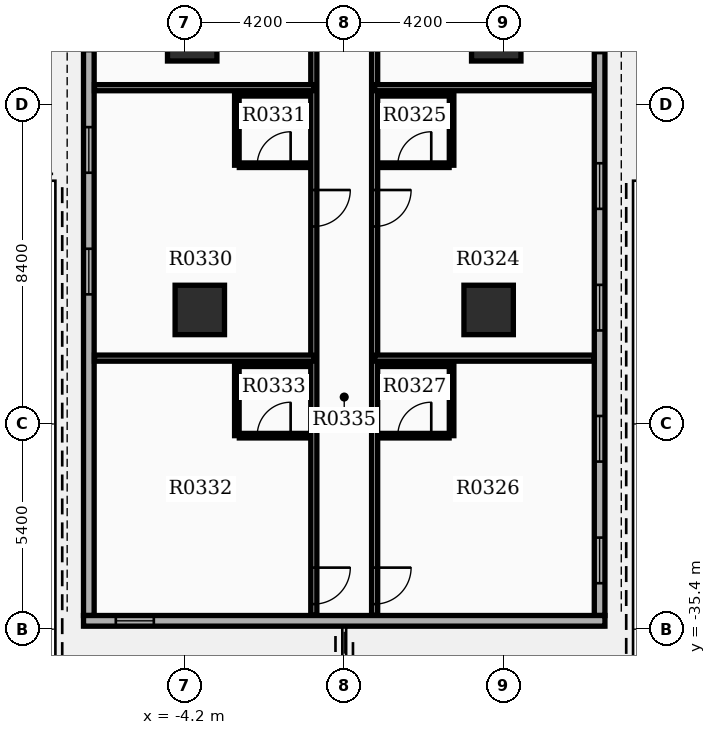
"""IFC4 building model, lengths in metres.
Left out: names, types, materials, properties, quantities, classifications, styles, units other than length and angle.
Written with IfcOpenShell. Run it as: python <this file> out.ifc"""

import sys

from ifc_helpers import new_model, si_unit, direction, frame, frame_2d, origin, origin_2d, place, context, subcontext, project, spatial, rectangle, extrude, element, fill, save


model = new_model("IFC4")
c1 = context("Model", 3, precision=1e-05, world=origin(), true_north=direction((0.0, 1.0)))
c2 = subcontext(c1, "Body", "Model", "MODEL_VIEW")
j1 = project(units=[si_unit("LENGTHUNIT", "METRE"), si_unit("PLANEANGLEUNIT", "RADIAN")], contexts=[c1])
p1 = place(None, origin())
s1 = spatial("IfcSite", under=j1, at=p1, CompositionType="ELEMENT")
p2 = place(p1, origin())
s2 = spatial("IfcBuilding", under=s1, at=p2, CompositionType="ELEMENT")
p3 = place(p2, frame((0.0, 0.0, 23.7)))
s3 = spatial("IfcBuildingStorey", under=s2, at=p3, CompositionType="ELEMENT", Elevation=23.7)
for number, where, z_axis, x_axis in (
    (1, (-4.0, -19.8, 0.0), (0.0, 0.0, 1.0), (1.0, 0.0, 0.0)),
    (2, (4.0, -19.8, 0.0), (0.0, 0.0, 1.0), (1.0, 0.0, 0.0)),
    (3, (-3.8, -27.0, 0.0), (0.0, 0.0, 1.0), (1.0, 0.0, 0.0)),
    (4, (3.8, -27.0, 0.0), (0.0, 0.0, 1.0), (1.0, 0.0, 0.0)),
):
    element("IfcColumn", number, at=place(p3, frame(where, z_axis=z_axis, x_axis=x_axis)), inside=s3, PredefinedType="COLUMN", context=c2, shape_type="SweptSolid", body=[
        extrude(rectangle(XDim=1.3, YDim=1.3, at=origin_2d()), origin(), (0.0, 0.0, 1.0), 3.9),
    ])
p4 = place(p3, frame((-6.72, -14.94, 0.0), z_axis=(0.0, 0.0, 1.0), x_axis=(0.0, -1.0, 0.0)))
e5 = element("IfcWall", 5, at=p4, inside=s3, PredefinedType="STANDARD", context=c2, shape_type="SweptSolid", body=[
    extrude(rectangle(XDim=20.1, YDim=0.28, at=frame_2d((10.05, 0.0))), origin(), (0.0, 0.0, 1.0), 2.91),
])
p5 = place(p4, frame((0.85, 0.0, 0.8)))
e6 = element("IfcOpeningElement", 6, at=p5, cuts=e5, PredefinedType="OPENING", context=c2, shape_type="SweptSolid", body=[
    extrude(rectangle(XDim=1.2, YDim=1.6, at=frame_2d((0.6, 0.8))), frame((0.0, 0.15, 0.0), z_axis=(0.0, -1.0, 0.0), x_axis=(1.0, 0.0, 0.0)), (0.0, 0.0, 1.0), 0.3),
])
p6 = place(p4, frame((4.05, 0.0, 0.8)))
e7 = element("IfcOpeningElement", 7, at=p6, cuts=e5, PredefinedType="OPENING", context=c2, shape_type="SweptSolid", body=[
    extrude(rectangle(XDim=1.2, YDim=1.6, at=frame_2d((0.6, 0.8))), frame((0.0, 0.15, 0.0), z_axis=(0.0, -1.0, 0.0), x_axis=(1.0, 0.0, 0.0)), (0.0, 0.0, 1.0), 0.3),
])
p7 = place(p4, frame((7.25, 0.0, 0.8)))
e8 = element("IfcOpeningElement", 8, at=p7, cuts=e5, PredefinedType="OPENING", context=c2, shape_type="SweptSolid", body=[
    extrude(rectangle(XDim=1.2, YDim=1.6, at=frame_2d((0.6, 0.8))), frame((0.0, 0.15, 0.0), z_axis=(0.0, -1.0, 0.0), x_axis=(1.0, 0.0, 0.0)), (0.0, 0.0, 1.0), 0.3),
])
p8 = place(p4, frame((10.45, 0.0, 0.8)))
e9 = element("IfcOpeningElement", 9, at=p8, cuts=e5, PredefinedType="OPENING", context=c2, shape_type="SweptSolid", body=[
    extrude(rectangle(XDim=1.2, YDim=1.6, at=frame_2d((0.6, 0.8))), frame((0.0, 0.15, 0.0), z_axis=(0.0, -1.0, 0.0), x_axis=(1.0, 0.0, 0.0)), (0.0, 0.0, 1.0), 0.3),
])
p9 = place(p3, frame((6.72, -35.04, 0.0), z_axis=(0.0, 0.0, 1.0), x_axis=(0.0, 1.0, 0.0)))
e10 = element("IfcWall", 10, at=p9, inside=s3, PredefinedType="STANDARD", context=c2, shape_type="SweptSolid", body=[
    extrude(rectangle(XDim=20.1, YDim=0.28, at=frame_2d((10.05, 0.0))), origin(), (0.0, 0.0, 1.0), 2.91),
])
p10 = place(p9, frame((0.85, 0.0, 0.8)))
e11 = element("IfcOpeningElement", 11, at=p10, cuts=e10, PredefinedType="OPENING", context=c2, shape_type="SweptSolid", body=[
    extrude(rectangle(XDim=1.2, YDim=1.6, at=frame_2d((0.6, 0.8))), frame((0.0, 0.15, 0.0), z_axis=(0.0, -1.0, 0.0), x_axis=(1.0, 0.0, 0.0)), (0.0, 0.0, 1.0), 0.3),
])
p11 = place(p9, frame((4.05, 0.0, 0.8)))
e12 = element("IfcOpeningElement", 12, at=p11, cuts=e10, PredefinedType="OPENING", context=c2, shape_type="SweptSolid", body=[
    extrude(rectangle(XDim=1.2, YDim=1.6, at=frame_2d((0.6, 0.8))), frame((0.0, 0.15, 0.0), z_axis=(0.0, -1.0, 0.0), x_axis=(1.0, 0.0, 0.0)), (0.0, 0.0, 1.0), 0.3),
])
p12 = place(p9, frame((7.5, 0.0, 0.8)))
e13 = element("IfcOpeningElement", 13, at=p12, cuts=e10, PredefinedType="OPENING", context=c2, shape_type="SweptSolid", body=[
    extrude(rectangle(XDim=1.2, YDim=1.6, at=frame_2d((0.6, 0.8))), frame((0.0, 0.15, 0.0), z_axis=(0.0, -1.0, 0.0), x_axis=(1.0, 0.0, 0.0)), (0.0, 0.0, 1.0), 0.3),
])
p13 = place(p9, frame((10.7, 0.0, 0.8)))
e14 = element("IfcOpeningElement", 14, at=p13, cuts=e10, PredefinedType="OPENING", context=c2, shape_type="SweptSolid", body=[
    extrude(rectangle(XDim=1.2, YDim=1.6, at=frame_2d((0.6, 0.8))), frame((0.0, 0.15, 0.0), z_axis=(0.0, -1.0, 0.0), x_axis=(1.0, 0.0, 0.0)), (0.0, 0.0, 1.0), 0.3),
])
p14 = place(p9, frame((14.799, 0.0, 0.85)))
e15 = element("IfcOpeningElement", 15, at=p14, cuts=e10, PredefinedType="OPENING", context=c2, shape_type="SweptSolid", body=[
    extrude(rectangle(XDim=1.2, YDim=1.6, at=frame_2d((0.6, 0.8))), frame((0.0, 0.15, 0.0), z_axis=(0.0, -1.0, 0.0), x_axis=(1.0, 0.0, 0.0)), (0.0, 0.0, 1.0), 0.3),
])
p15 = place(p3, frame((-6.86, -35.18, 0.0), z_axis=(0.0, 0.0, 1.0), x_axis=(1.0, 0.0, 0.0)))
e16 = element("IfcWall", 16, at=p15, inside=s3, PredefinedType="STANDARD", context=c2, shape_type="SweptSolid", body=[
    extrude(rectangle(XDim=13.72, YDim=0.28, at=frame_2d((6.86, 0.0))), origin(), (0.0, 0.0, 1.0), 2.91),
])
p16 = place(p15, frame((0.85, 0.0, 0.85)))
e17 = element("IfcOpeningElement", 17, at=p16, cuts=e16, PredefinedType="OPENING", context=c2, shape_type="SweptSolid", body=[
    extrude(rectangle(XDim=1.0, YDim=1.5, at=frame_2d((0.5, 0.75))), frame((0.0, 0.15, 0.0), z_axis=(0.0, -1.0, 0.0), x_axis=(1.0, 0.0, 0.0)), (0.0, 0.0, 1.0), 0.3),
])
p17 = place(p3, frame((0.8, -14.85, 0.0), z_axis=(0.0, 0.0, 1.0), x_axis=(0.0, -1.0, 0.0)))
e18 = element("IfcWall", 18, at=p17, inside=s3, PredefinedType="PARTITIONING", context=c2, shape_type="SweptSolid", body=[
    extrude(rectangle(XDim=20.182, YDim=0.16, at=frame_2d((10.091, 0.0))), origin(), (0.0, 0.0, 1.0), 2.9),
])
p18 = place(p17, frame((2.61, 0.0, 0.0)))
e19 = element("IfcOpeningElement", 19, at=p18, cuts=e18, PredefinedType="OPENING", context=c2, shape_type="SweptSolid", body=[
    extrude(rectangle(XDim=0.96, YDim=2.15, at=frame_2d((0.48, 1.075))), frame((0.0, 0.09, 0.0), z_axis=(0.0, -1.0, 0.0), x_axis=(1.0, 0.0, 0.0)), (0.0, 0.0, 1.0), 0.18),
])
p19 = place(p17, frame((8.994, 0.0, 0.0)))
e20 = element("IfcOpeningElement", 20, at=p19, cuts=e18, PredefinedType="OPENING", context=c2, shape_type="SweptSolid", body=[
    extrude(rectangle(XDim=0.96, YDim=2.15, at=frame_2d((0.48, 1.075))), frame((0.0, 0.09, 0.0), z_axis=(0.0, -1.0, 0.0), x_axis=(1.0, 0.0, 0.0)), (0.0, 0.0, 1.0), 0.18),
])
p20 = place(p17, frame((18.93, 0.0, 0.0)))
e21 = element("IfcOpeningElement", 21, at=p20, cuts=e18, PredefinedType="OPENING", context=c2, shape_type="SweptSolid", body=[
    extrude(rectangle(XDim=0.96, YDim=2.15, at=frame_2d((0.48, 1.075))), frame((0.0, 0.09, 0.0), z_axis=(0.0, -1.0, 0.0), x_axis=(1.0, 0.0, 0.0)), (0.0, 0.0, 1.0), 0.18),
])
for number, where, z_axis, x_axis in (
    (22, (0.8, -21.152, 0.0), (0.0, 0.0, 1.0), (1.0, 0.0, 0.0)),
    (23, (0.8, -28.268, 0.0), (0.0, 0.0, 1.0), (1.0, 0.0, 0.0)),
):
    element("IfcWall", number, at=place(p3, frame(where, z_axis=z_axis, x_axis=x_axis)), inside=s3, PredefinedType="PARTITIONING", context=c2, shape_type="SweptSolid", body=[
        extrude(rectangle(XDim=5.772, YDim=0.16, at=frame_2d((2.886, 0.0))), origin(), (0.0, 0.0, 1.0), 2.9),
    ])
p21 = place(p3, frame((0.94, -23.192, 0.0), z_axis=(0.0, 0.0, 1.0), x_axis=(1.0, 0.0, 0.0)))
e24 = element("IfcWall", 24, at=p21, inside=s3, PredefinedType="PARTITIONING", context=c2, shape_type="SweptSolid", body=[
    extrude(rectangle(XDim=1.82, YDim=0.12, at=frame_2d((0.91, 0.0))), origin(), (0.0, 0.0, 1.0), 2.9),
])
p22 = place(p21, frame((0.47, 0.0, 0.0)))
e25 = element("IfcOpeningElement", 25, at=p22, cuts=e24, PredefinedType="OPENING", context=c2, shape_type="SweptSolid", body=[
    extrude(rectangle(XDim=0.88, YDim=2.1, at=frame_2d((0.44, 1.05))), frame((0.0, 0.07, 0.0), z_axis=(0.0, -1.0, 0.0), x_axis=(1.0, 0.0, 0.0)), (0.0, 0.0, 1.0), 0.14),
])
p23 = place(p3, frame((0.94, -21.312, 0.0), z_axis=(0.0, 0.0, 1.0), x_axis=(1.0, 0.0, 0.0)))
e26 = element("IfcWall", 26, at=p23, inside=s3, PredefinedType="PARTITIONING", context=c2, shape_type="SweptSolid", body=[
    extrude(rectangle(XDim=1.82, YDim=0.12, at=frame_2d((0.91, 0.0))), origin(), (0.0, 0.0, 1.0), 2.9),
])
p24 = place(p3, frame((2.825, -21.312, 0.0), z_axis=(0.0, 0.0, 1.0), x_axis=(0.0, -1.0, 0.0)))
e27 = element("IfcWall", 27, at=p24, inside=s3, PredefinedType="PARTITIONING", context=c2, shape_type="SweptSolid", body=[
    extrude(rectangle(XDim=1.88, YDim=0.12, at=frame_2d((0.94, 0.0))), origin(), (0.0, 0.0, 1.0), 2.9),
])
p25 = place(p3, frame((0.94, -30.308, 0.0), z_axis=(0.0, 0.0, 1.0), x_axis=(1.0, 0.0, 0.0)))
e28 = element("IfcWall", 28, at=p25, inside=s3, PredefinedType="PARTITIONING", context=c2, shape_type="SweptSolid", body=[
    extrude(rectangle(XDim=1.82, YDim=0.12, at=frame_2d((0.91, 0.0))), origin(), (0.0, 0.0, 1.0), 2.9),
])
p26 = place(p25, frame((0.47, 0.0, 0.0)))
e29 = element("IfcOpeningElement", 29, at=p26, cuts=e28, PredefinedType="OPENING", context=c2, shape_type="SweptSolid", body=[
    extrude(rectangle(XDim=0.88, YDim=2.1, at=frame_2d((0.44, 1.05))), frame((0.0, 0.07, 0.0), z_axis=(0.0, -1.0, 0.0), x_axis=(1.0, 0.0, 0.0)), (0.0, 0.0, 1.0), 0.14),
])
p27 = place(p3, frame((0.94, -28.428, 0.0), z_axis=(0.0, 0.0, 1.0), x_axis=(1.0, 0.0, 0.0)))
e30 = element("IfcWall", 30, at=p27, inside=s3, PredefinedType="PARTITIONING", context=c2, shape_type="SweptSolid", body=[
    extrude(rectangle(XDim=1.82, YDim=0.12, at=frame_2d((0.91, 0.0))), origin(), (0.0, 0.0, 1.0), 2.9),
])
p28 = place(p3, frame((2.825, -28.428, 0.0), z_axis=(0.0, 0.0, 1.0), x_axis=(0.0, -1.0, 0.0)))
e31 = element("IfcWall", 31, at=p28, inside=s3, PredefinedType="PARTITIONING", context=c2, shape_type="SweptSolid", body=[
    extrude(rectangle(XDim=1.88, YDim=0.12, at=frame_2d((0.94, 0.0))), origin(), (0.0, 0.0, 1.0), 2.9),
])
p29 = place(p3, frame((-0.8, -14.85, 0.0), z_axis=(0.0, 0.0, 1.0), x_axis=(0.0, -1.0, 0.0)))
e32 = element("IfcWall", 32, at=p29, inside=s3, PredefinedType="PARTITIONING", context=c2, shape_type="SweptSolid", body=[
    extrude(rectangle(XDim=20.182, YDim=0.16, at=frame_2d((10.091, 0.0))), origin(), (0.0, 0.0, 1.0), 2.9),
])
p30 = place(p29, frame((2.61, 0.0, 0.0)))
e33 = element("IfcOpeningElement", 33, at=p30, cuts=e32, PredefinedType="OPENING", context=c2, shape_type="SweptSolid", body=[
    extrude(rectangle(XDim=0.96, YDim=2.15, at=frame_2d((0.48, 1.075))), frame((0.0, 0.09, 0.0), z_axis=(0.0, -1.0, 0.0), x_axis=(1.0, 0.0, 0.0)), (0.0, 0.0, 1.0), 0.18),
])
p31 = place(p29, frame((8.994, 0.0, 0.0)))
e34 = element("IfcOpeningElement", 34, at=p31, cuts=e32, PredefinedType="OPENING", context=c2, shape_type="SweptSolid", body=[
    extrude(rectangle(XDim=0.96, YDim=2.15, at=frame_2d((0.48, 1.075))), frame((0.0, 0.09, 0.0), z_axis=(0.0, -1.0, 0.0), x_axis=(1.0, 0.0, 0.0)), (0.0, 0.0, 1.0), 0.18),
])
p32 = place(p29, frame((18.93, 0.0, 0.0)))
e35 = element("IfcOpeningElement", 35, at=p32, cuts=e32, PredefinedType="OPENING", context=c2, shape_type="SweptSolid", body=[
    extrude(rectangle(XDim=0.96, YDim=2.15, at=frame_2d((0.48, 1.075))), frame((0.0, 0.09, 0.0), z_axis=(0.0, -1.0, 0.0), x_axis=(1.0, 0.0, 0.0)), (0.0, 0.0, 1.0), 0.18),
])
for number, where, z_axis, x_axis in (
    (36, (-0.8, -21.152, 0.0), (0.0, 0.0, 1.0), (-1.0, 0.0, 0.0)),
    (37, (-0.8, -28.268, 0.0), (0.0, 0.0, 1.0), (-1.0, 0.0, 0.0)),
):
    element("IfcWall", number, at=place(p3, frame(where, z_axis=z_axis, x_axis=x_axis)), inside=s3, PredefinedType="PARTITIONING", context=c2, shape_type="SweptSolid", body=[
        extrude(rectangle(XDim=5.772, YDim=0.16, at=frame_2d((2.886, 0.0))), origin(), (0.0, 0.0, 1.0), 2.9),
    ])
p33 = place(p3, frame((-2.76, -23.192, 0.0), z_axis=(0.0, 0.0, 1.0), x_axis=(1.0, 0.0, 0.0)))
e38 = element("IfcWall", 38, at=p33, inside=s3, PredefinedType="PARTITIONING", context=c2, shape_type="SweptSolid", body=[
    extrude(rectangle(XDim=1.82, YDim=0.12, at=frame_2d((0.91, 0.0))), origin(), (0.0, 0.0, 1.0), 2.9),
])
p34 = place(p33, frame((0.47, 0.0, 0.0)))
e39 = element("IfcOpeningElement", 39, at=p34, cuts=e38, PredefinedType="OPENING", context=c2, shape_type="SweptSolid", body=[
    extrude(rectangle(XDim=0.88, YDim=2.1, at=frame_2d((0.44, 1.05))), frame((0.0, 0.07, 0.0), z_axis=(0.0, -1.0, 0.0), x_axis=(1.0, 0.0, 0.0)), (0.0, 0.0, 1.0), 0.14),
])
p35 = place(p3, frame((-2.76, -21.312, 0.0), z_axis=(0.0, 0.0, 1.0), x_axis=(1.0, 0.0, 0.0)))
e40 = element("IfcWall", 40, at=p35, inside=s3, PredefinedType="PARTITIONING", context=c2, shape_type="SweptSolid", body=[
    extrude(rectangle(XDim=1.82, YDim=0.12, at=frame_2d((0.91, 0.0))), origin(), (0.0, 0.0, 1.0), 2.9),
])
p36 = place(p3, frame((-2.825, -21.312, 0.0), z_axis=(0.0, 0.0, 1.0), x_axis=(0.0, -1.0, 0.0)))
e41 = element("IfcWall", 41, at=p36, inside=s3, PredefinedType="PARTITIONING", context=c2, shape_type="SweptSolid", body=[
    extrude(rectangle(XDim=1.88, YDim=0.12, at=frame_2d((0.94, 0.0))), origin(), (0.0, 0.0, 1.0), 2.9),
])
p37 = place(p3, frame((-2.76, -30.308, 0.0), z_axis=(0.0, 0.0, 1.0), x_axis=(1.0, 0.0, 0.0)))
e42 = element("IfcWall", 42, at=p37, inside=s3, PredefinedType="PARTITIONING", context=c2, shape_type="SweptSolid", body=[
    extrude(rectangle(XDim=1.82, YDim=0.12, at=frame_2d((0.91, 0.0))), origin(), (0.0, 0.0, 1.0), 2.9),
])
p38 = place(p37, frame((0.47, 0.0, 0.0)))
e43 = element("IfcOpeningElement", 43, at=p38, cuts=e42, PredefinedType="OPENING", context=c2, shape_type="SweptSolid", body=[
    extrude(rectangle(XDim=0.88, YDim=2.1, at=frame_2d((0.44, 1.05))), frame((0.0, 0.07, 0.0), z_axis=(0.0, -1.0, 0.0), x_axis=(1.0, 0.0, 0.0)), (0.0, 0.0, 1.0), 0.14),
])
p39 = place(p3, frame((-2.76, -28.428, 0.0), z_axis=(0.0, 0.0, 1.0), x_axis=(1.0, 0.0, 0.0)))
e44 = element("IfcWall", 44, at=p39, inside=s3, PredefinedType="PARTITIONING", context=c2, shape_type="SweptSolid", body=[
    extrude(rectangle(XDim=1.82, YDim=0.12, at=frame_2d((0.91, 0.0))), origin(), (0.0, 0.0, 1.0), 2.9),
])
p40 = place(p3, frame((-2.825, -28.428, 0.0), z_axis=(0.0, 0.0, 1.0), x_axis=(0.0, -1.0, 0.0)))
e45 = element("IfcWall", 45, at=p40, inside=s3, PredefinedType="PARTITIONING", context=c2, shape_type="SweptSolid", body=[
    extrude(rectangle(XDim=1.88, YDim=0.12, at=frame_2d((0.94, 0.0))), origin(), (0.0, 0.0, 1.0), 2.9),
])
p41 = place(p7, origin())
e46 = element("IfcWindow", 46, at=p41, inside=s3, PartitioningType="SINGLE_PANEL", PredefinedType="WINDOW", context=c2, shape_type="SweptSolid", body=[
    extrude(rectangle(XDim=1.2, YDim=1.6, at=frame_2d((0.6, 0.8))), frame((0.0, 0.03, 0.0), z_axis=(0.0, -1.0, 0.0), x_axis=(1.0, 0.0, 0.0)), (0.0, 0.0, 1.0), 0.06),
])
fill(e8, e46)
p42 = place(p8, origin())
e47 = element("IfcWindow", 47, at=p42, inside=s3, PartitioningType="SINGLE_PANEL", PredefinedType="WINDOW", context=c2, shape_type="SweptSolid", body=[
    extrude(rectangle(XDim=1.2, YDim=1.6, at=frame_2d((0.6, 0.8))), frame((0.0, 0.03, 0.0), z_axis=(0.0, -1.0, 0.0), x_axis=(1.0, 0.0, 0.0)), (0.0, 0.0, 1.0), 0.06),
])
fill(e9, e47)
p43 = place(p10, origin())
e48 = element("IfcWindow", 48, at=p43, inside=s3, PartitioningType="SINGLE_PANEL", PredefinedType="WINDOW", context=c2, shape_type="SweptSolid", body=[
    extrude(rectangle(XDim=1.2, YDim=1.6, at=frame_2d((0.6, 0.8))), frame((0.0, 0.03, 0.0), z_axis=(0.0, -1.0, 0.0), x_axis=(1.0, 0.0, 0.0)), (0.0, 0.0, 1.0), 0.06),
])
fill(e11, e48)
p44 = place(p11, origin())
e49 = element("IfcWindow", 49, at=p44, inside=s3, PartitioningType="SINGLE_PANEL", PredefinedType="WINDOW", context=c2, shape_type="SweptSolid", body=[
    extrude(rectangle(XDim=1.2, YDim=1.6, at=frame_2d((0.6, 0.8))), frame((0.0, 0.03, 0.0), z_axis=(0.0, -1.0, 0.0), x_axis=(1.0, 0.0, 0.0)), (0.0, 0.0, 1.0), 0.06),
])
fill(e12, e49)
p45 = place(p12, origin())
e50 = element("IfcWindow", 50, at=p45, inside=s3, PartitioningType="SINGLE_PANEL", PredefinedType="WINDOW", context=c2, shape_type="SweptSolid", body=[
    extrude(rectangle(XDim=1.2, YDim=1.6, at=frame_2d((0.6, 0.8))), frame((0.0, 0.03, 0.0), z_axis=(0.0, -1.0, 0.0), x_axis=(1.0, 0.0, 0.0)), (0.0, 0.0, 1.0), 0.06),
])
fill(e13, e50)
p46 = place(p13, origin())
e51 = element("IfcWindow", 51, at=p46, inside=s3, PartitioningType="SINGLE_PANEL", PredefinedType="WINDOW", context=c2, shape_type="SweptSolid", body=[
    extrude(rectangle(XDim=1.2, YDim=1.6, at=frame_2d((0.6, 0.8))), frame((0.0, 0.03, 0.0), z_axis=(0.0, -1.0, 0.0), x_axis=(1.0, 0.0, 0.0)), (0.0, 0.0, 1.0), 0.06),
])
fill(e14, e51)
p47 = place(p16, origin())
e52 = element("IfcWindow", 52, at=p47, inside=s3, PartitioningType="SINGLE_PANEL", PredefinedType="WINDOW", context=c2, shape_type="SweptSolid", body=[
    extrude(rectangle(XDim=1.0, YDim=1.5, at=frame_2d((0.5, 0.75))), frame((0.0, 0.03, 0.0), z_axis=(0.0, -1.0, 0.0), x_axis=(1.0, 0.0, 0.0)), (0.0, 0.0, 1.0), 0.06),
])
fill(e17, e52)
p48 = place(p14, origin())
e53 = element("IfcWindow", 53, at=p48, inside=s3, PartitioningType="SINGLE_PANEL", PredefinedType="WINDOW", context=c2, shape_type="SweptSolid", body=[
    extrude(rectangle(XDim=1.2, YDim=1.6, at=frame_2d((0.6, 0.8))), frame((0.0, 0.03, 0.0), z_axis=(0.0, -1.0, 0.0), x_axis=(1.0, 0.0, 0.0)), (0.0, 0.0, 1.0), 0.06),
])
fill(e15, e53)
p49 = place(p19, origin())
e54 = element("IfcDoor", 54, at=p49, inside=s3, OperationType="SINGLE_SWING_LEFT", PredefinedType="DOOR", context=c2, shape_type="SweptSolid", body=[
    extrude(rectangle(XDim=0.96, YDim=2.15, at=frame_2d((0.48, 1.075))), frame((0.0, 0.025, 0.0), z_axis=(0.0, -1.0, 0.0), x_axis=(1.0, 0.0, 0.0)), (0.0, 0.0, 1.0), 0.05),
])
fill(e20, e54)
p50 = place(p22, origin())
e55 = element("IfcDoor", 55, at=p50, inside=s3, OperationType="SINGLE_SWING_RIGHT", PredefinedType="DOOR", context=c2, shape_type="SweptSolid", body=[
    extrude(rectangle(XDim=0.88, YDim=2.1, at=frame_2d((0.44, 1.05))), frame((0.0, 0.025, 0.0), z_axis=(0.0, -1.0, 0.0), x_axis=(1.0, 0.0, 0.0)), (0.0, 0.0, 1.0), 0.05),
])
fill(e25, e55)
p51 = place(p20, origin())
e56 = element("IfcDoor", 56, at=p51, inside=s3, OperationType="SINGLE_SWING_LEFT", PredefinedType="DOOR", context=c2, shape_type="SweptSolid", body=[
    extrude(rectangle(XDim=0.96, YDim=2.15, at=frame_2d((0.48, 1.075))), frame((0.0, 0.025, 0.0), z_axis=(0.0, -1.0, 0.0), x_axis=(1.0, 0.0, 0.0)), (0.0, 0.0, 1.0), 0.05),
])
fill(e21, e56)
p52 = place(p26, origin())
e57 = element("IfcDoor", 57, at=p52, inside=s3, OperationType="SINGLE_SWING_RIGHT", PredefinedType="DOOR", context=c2, shape_type="SweptSolid", body=[
    extrude(rectangle(XDim=0.88, YDim=2.1, at=frame_2d((0.44, 1.05))), frame((0.0, 0.025, 0.0), z_axis=(0.0, -1.0, 0.0), x_axis=(1.0, 0.0, 0.0)), (0.0, 0.0, 1.0), 0.05),
])
fill(e29, e57)
p53 = place(p31, origin())
e58 = element("IfcDoor", 58, at=p53, inside=s3, OperationType="SINGLE_SWING_LEFT", PredefinedType="DOOR", context=c2, shape_type="SweptSolid", body=[
    extrude(rectangle(XDim=0.96, YDim=2.15, at=frame_2d((0.48, 1.075))), frame((0.0, 0.025, 0.0), z_axis=(0.0, -1.0, 0.0), x_axis=(1.0, 0.0, 0.0)), (0.0, 0.0, 1.0), 0.05),
])
fill(e34, e58)
p54 = place(p34, origin())
e59 = element("IfcDoor", 59, at=p54, inside=s3, OperationType="SINGLE_SWING_RIGHT", PredefinedType="DOOR", context=c2, shape_type="SweptSolid", body=[
    extrude(rectangle(XDim=0.88, YDim=2.1, at=frame_2d((0.44, 1.05))), frame((0.0, 0.025, 0.0), z_axis=(0.0, -1.0, 0.0), x_axis=(1.0, 0.0, 0.0)), (0.0, 0.0, 1.0), 0.05),
])
fill(e39, e59)
p55 = place(p32, origin())
e60 = element("IfcDoor", 60, at=p55, inside=s3, OperationType="SINGLE_SWING_LEFT", PredefinedType="DOOR", context=c2, shape_type="SweptSolid", body=[
    extrude(rectangle(XDim=0.96, YDim=2.15, at=frame_2d((0.48, 1.075))), frame((0.0, 0.025, 0.0), z_axis=(0.0, -1.0, 0.0), x_axis=(1.0, 0.0, 0.0)), (0.0, 0.0, 1.0), 0.05),
])
fill(e35, e60)
p56 = place(p38, origin())
e61 = element("IfcDoor", 61, at=p56, inside=s3, OperationType="SINGLE_SWING_RIGHT", PredefinedType="DOOR", context=c2, shape_type="SweptSolid", body=[
    extrude(rectangle(XDim=0.88, YDim=2.1, at=frame_2d((0.44, 1.05))), frame((0.0, 0.025, 0.0), z_axis=(0.0, -1.0, 0.0), x_axis=(1.0, 0.0, 0.0)), (0.0, 0.0, 1.0), 0.05),
])
fill(e43, e61)
save(model, sys.argv[1])
